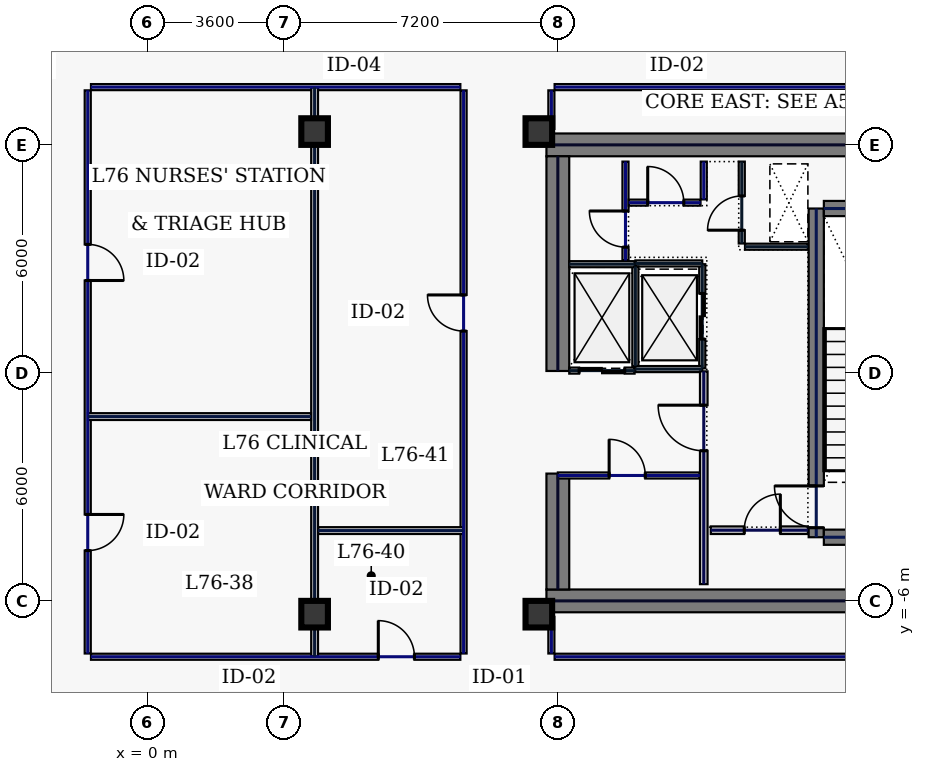
"""IFC4 building model, lengths in metres.
Left out: names, types, materials, properties, quantities, classifications, styles, units other than length and angle.
Written with IfcOpenShell. Run it as: python <this file> out.ifc"""

import sys

from ifc_helpers import new_model, si_unit, direction, frame, frame_2d, origin, origin_2d, place, context, subcontext, project, spatial, rectangle, hollow_rectangle, extrude, element, fill, save


model = new_model("IFC4")
c1 = context("Model", 3, precision=1e-05, world=origin(), true_north=direction((0.0, 1.0)))
c2 = subcontext(c1, "Body", "Model", "MODEL_VIEW")
j1 = project(units=[si_unit("LENGTHUNIT", "METRE"), si_unit("PLANEANGLEUNIT", "RADIAN")], contexts=[c1])
p1 = place(None, origin())
s1 = spatial("IfcSite", under=j1, at=p1, CompositionType="ELEMENT")
p2 = place(p1, origin())
s2 = spatial("IfcBuilding", under=s1, at=p2, CompositionType="ELEMENT")
p3 = place(p2, frame((0.0, 0.0, 325.0)))
s3 = spatial("IfcBuildingStorey", under=s2, at=p3, CompositionType="ELEMENT", Elevation=325.0)
for number, where, z_axis, x_axis in (
    (1, (10.5, 6.0, 0.0), (0.0, 0.0, 1.0), (1.0, 0.0, 0.0)),
    (2, (10.5, -6.0, 0.0), (0.0, 0.0, 1.0), (1.0, 0.0, 0.0)),
):
    element("IfcWall", number, at=place(p3, frame(where, z_axis=z_axis, x_axis=x_axis)), inside=s3, PredefinedType="SHEAR", context=c2, shape_type="SweptSolid", body=[
        extrude(rectangle(XDim=11.5, YDim=0.6, at=frame_2d((5.75, 0.0))), origin(), (0.0, 0.0, 1.0), 3.74),
    ])
p4 = place(p3, frame((10.8, -5.7, 0.0), z_axis=(0.0, 0.0, 1.0), x_axis=(0.0, 1.0, 0.0)))
e3 = element("IfcWall", 3, at=p4, inside=s3, PredefinedType="SHEAR", context=c2, shape_type="SweptSolid", body=[
    extrude(rectangle(XDim=3.05, YDim=0.6, at=frame_2d((1.525, 0.0))), origin(), (0.0, 0.0, 1.0), 3.74),
])
p5 = place(p3, frame((10.8, 0.05, 0.0), z_axis=(0.0, 0.0, 1.0), x_axis=(0.0, 1.0, 0.0)))
e4 = element("IfcWall", 4, at=p5, inside=s3, PredefinedType="SHEAR", context=c2, shape_type="SweptSolid", body=[
    extrude(rectangle(XDim=5.65, YDim=0.6, at=frame_2d((2.825, 0.0))), origin(), (0.0, 0.0, 1.0), 3.74),
])
p6 = place(p3, frame((17.6, -4.325, 0.0), z_axis=(0.0, 0.0, 1.0), x_axis=(0.0, 1.0, 0.0)))
e5 = element("IfcWall", 5, at=p6, inside=s3, PredefinedType="SHEAR", context=c2, shape_type="SweptSolid", body=[
    extrude(rectangle(XDim=8.65, YDim=0.4, at=frame_2d((4.325, 0.0))), origin(), (0.0, 0.0, 1.0), 3.74),
])
p7 = place(p6, frame((0.25, 0.0, 0.0)))
e6 = element("IfcOpeningElement", 6, at=p7, cuts=e5, PredefinedType="OPENING", context=c2, shape_type="SweptSolid", body=[
    extrude(rectangle(XDim=1.1, YDim=2.2, at=frame_2d((0.55, 1.1))), frame((0.0, 0.21, 0.0), z_axis=(0.0, -1.0, 0.0), x_axis=(1.0, 0.0, 0.0)), (0.0, 0.0, 1.0), 0.42),
])
for number, where, z_axis, x_axis in (
    (7, (17.8, -4.325, 0.0), (0.0, 0.0, 1.0), (1.0, 0.0, 0.0)),
    (8, (17.8, 4.325, 0.0), (0.0, 0.0, 1.0), (1.0, 0.0, 0.0)),
):
    element("IfcWall", number, at=place(p3, frame(where, z_axis=z_axis, x_axis=x_axis)), inside=s3, PredefinedType="SHEAR", context=c2, shape_type="SweptSolid", body=[
        extrude(rectangle(XDim=3.4, YDim=0.4, at=frame_2d((1.7, 0.0))), origin(), (0.0, 0.0, 1.0), 3.74),
    ])
for number, where, z_axis, x_axis in (
    (9, (10.3, -6.35, 0.0), (0.0, 0.0, 1.0), (1.0, 0.0, 0.0)),
    (10, (10.3, 6.35, 0.0), (0.0, 0.0, 1.0), (1.0, 0.0, 0.0)),
    (11, (4.4, -6.35, 0.0), (0.0, 0.0, 1.0), (1.0, 0.0, 0.0)),
    (12, (4.4, 6.35, 0.0), (0.0, 0.0, 1.0), (1.0, 0.0, 0.0)),
):
    element("IfcColumn", number, at=place(p3, frame(where, z_axis=z_axis, x_axis=x_axis)), inside=s3, PredefinedType="COLUMN", context=c2, shape_type="SweptSolid", body=[
        extrude(hollow_rectangle(XDim=0.7, YDim=0.7, WallThickness=0.032, at=origin_2d()), origin(), (0.0, 0.0, 1.0), 3.74),
    ])
p8 = place(p3, frame((14.6, 0.12, 0.0), z_axis=(0.0, 0.0, 1.0), x_axis=(0.0, 1.0, 0.0)))
e13 = element("IfcWall", 13, at=p8, inside=s3, PredefinedType="PARTITIONING", context=c2, shape_type="SweptSolid", body=[
    extrude(rectangle(XDim=2.74, YDim=0.16, at=frame_2d((1.37, 0.0))), origin(), (0.0, 0.0, 1.0), 3.74),
])
p9 = place(p8, frame((0.77, 0.0, 0.0)))
e14 = element("IfcOpeningElement", 14, at=p9, cuts=e13, PredefinedType="OPENING", context=c2, shape_type="SweptSolid", body=[
    extrude(rectangle(XDim=1.2, YDim=2.2, at=frame_2d((0.6, 1.1))), frame((0.0, 0.09, 0.0), z_axis=(0.0, -1.0, 0.0), x_axis=(1.0, 0.0, 0.0)), (0.0, 0.0, 1.0), 0.18),
])
for number, where, z_axis, x_axis in (
    (15, (12.84, 0.1, 0.0), (0.0, 0.0, 1.0), (1.0, 0.0, 0.0)),
    (16, (12.84, 2.88, 0.0), (0.0, 0.0, 1.0), (1.0, 0.0, 0.0)),
):
    element("IfcWall", number, at=place(p3, frame(where, z_axis=z_axis, x_axis=x_axis)), inside=s3, PredefinedType="PARTITIONING", context=c2, shape_type="SweptSolid", body=[
        extrude(rectangle(XDim=1.76, YDim=0.16, at=frame_2d((0.88, 0.0))), origin(), (0.0, 0.0, 1.0), 3.74),
    ])
p10 = place(p3, frame((12.84, 0.18, 0.0), z_axis=(0.0, 0.0, 1.0), x_axis=(0.0, 1.0, 0.0)))
e17 = element("IfcWall", 17, at=p10, inside=s3, PredefinedType="PARTITIONING", context=c2, shape_type="SweptSolid", body=[
    extrude(rectangle(XDim=2.62, YDim=0.16, at=frame_2d((1.31, 0.0))), origin(), (0.0, 0.0, 1.0), 3.74),
])
p11 = place(p3, frame((11.1, 0.06, 0.0), z_axis=(0.0, 0.0, 1.0), x_axis=(1.0, 0.0, 0.0)))
e18 = element("IfcWall", 18, at=p11, inside=s3, PredefinedType="PARTITIONING", context=c2, shape_type="SweptSolid", body=[
    extrude(rectangle(XDim=1.72, YDim=0.16, at=frame_2d((0.86, 0.0))), origin(), (0.0, 0.0, 1.0), 3.74),
])
p12 = place(p11, frame((0.26, 0.0, 0.0)))
e19 = element("IfcOpeningElement", 19, at=p12, cuts=e18, PredefinedType="OPENING", context=c2, shape_type="SweptSolid", body=[
    extrude(rectangle(XDim=1.2, YDim=2.2, at=frame_2d((0.6, 1.1))), frame((0.0, 0.09, 0.0), z_axis=(0.0, -1.0, 0.0), x_axis=(1.0, 0.0, 0.0)), (0.0, 0.0, 1.0), 0.18),
])
p13 = place(p3, frame((11.1, 2.86, 0.0), z_axis=(0.0, 0.0, 1.0), x_axis=(1.0, 0.0, 0.0)))
e20 = element("IfcWall", 20, at=p13, inside=s3, PredefinedType="PARTITIONING", context=c2, shape_type="SweptSolid", body=[
    extrude(rectangle(XDim=1.72, YDim=0.16, at=frame_2d((0.86, 0.0))), origin(), (0.0, 0.0, 1.0), 3.74),
])
p14 = place(p3, frame((15.64, 3.405, 0.0), z_axis=(0.0, 0.0, 1.0), x_axis=(0.0, 1.0, 0.0)))
e21 = element("IfcWall", 21, at=p14, inside=s3, PredefinedType="PARTITIONING", context=c2, shape_type="SweptSolid", body=[
    extrude(rectangle(XDim=2.155, YDim=0.16, at=frame_2d((1.078, 0.0))), origin(), (0.0, 0.0, 1.0), 3.74),
])
p15 = place(p14, frame((0.35, 0.0, 0.0)))
e22 = element("IfcOpeningElement", 22, at=p15, cuts=e21, PredefinedType="OPENING", context=c2, shape_type="SweptSolid", body=[
    extrude(rectangle(XDim=0.9, YDim=2.2, at=frame_2d((0.45, 1.1))), frame((0.0, 0.09, 0.0), z_axis=(0.0, -1.0, 0.0), x_axis=(1.0, 0.0, 0.0)), (0.0, 0.0, 1.0), 0.18),
])
p16 = place(p3, frame((15.725, 3.32, 0.0), z_axis=(0.0, 0.0, 1.0), x_axis=(1.0, 0.0, 0.0)))
e23 = element("IfcWall", 23, at=p16, inside=s3, PredefinedType="PARTITIONING", context=c2, shape_type="SweptSolid", body=[
    extrude(rectangle(XDim=1.655, YDim=0.16, at=frame_2d((0.827, 0.0))), origin(), (0.0, 0.0, 1.0), 3.74),
])
p17 = place(p3, frame((14.825, -4.14, 0.0), z_axis=(0.0, 0.0, 1.0), x_axis=(1.0, 0.0, 0.0)))
e24 = element("IfcWall", 24, at=p17, inside=s3, PredefinedType="SOLIDWALL", context=c2, shape_type="SweptSolid", body=[
    extrude(rectangle(XDim=2.555, YDim=0.2, at=frame_2d((1.277, 0.0))), origin(), (0.0, 0.0, 1.0), 3.74),
])
p18 = place(p17, frame((0.88, 0.0, 0.0)))
e25 = element("IfcOpeningElement", 25, at=p18, cuts=e24, PredefinedType="OPENING", context=c2, shape_type="SweptSolid", body=[
    extrude(rectangle(XDim=0.95, YDim=2.2, at=frame_2d((0.475, 1.1))), frame((0.0, 0.11, 0.0), z_axis=(0.0, -1.0, 0.0), x_axis=(1.0, 0.0, 0.0)), (0.0, 0.0, 1.0), 0.22),
])
p19 = place(p3, frame((10.8, -2.7, 0.0), z_axis=(0.0, 0.0, 1.0), x_axis=(1.0, 0.0, 0.0)))
e26 = element("IfcWall", 26, at=p19, inside=s3, PredefinedType="PARTITIONING", context=c2, shape_type="SweptSolid", body=[
    extrude(rectangle(XDim=3.735, YDim=0.16, at=frame_2d((1.867, 0.0))), origin(), (0.0, 0.0, 1.0), 3.74),
])
p20 = place(p19, frame((1.35, 0.0, 0.0)))
e27 = element("IfcOpeningElement", 27, at=p20, cuts=e26, PredefinedType="OPENING", context=c2, shape_type="SweptSolid", body=[
    extrude(rectangle(XDim=0.95, YDim=2.2, at=frame_2d((0.475, 1.1))), frame((0.0, 0.09, 0.0), z_axis=(0.0, -1.0, 0.0), x_axis=(1.0, 0.0, 0.0)), (0.0, 0.0, 1.0), 0.18),
])
p21 = place(p3, frame((12.58, 2.96, 0.0), z_axis=(0.0, 0.0, 1.0), x_axis=(0.0, 1.0, 0.0)))
e28 = element("IfcWall", 28, at=p21, inside=s3, PredefinedType="PARTITIONING", context=c2, shape_type="SweptSolid", body=[
    extrude(rectangle(XDim=2.6, YDim=0.16, at=frame_2d((1.3, 0.0))), origin(), (0.0, 0.0, 1.0), 3.74),
])
p22 = place(p21, frame((0.35, 0.0, 0.0)))
e29 = element("IfcOpeningElement", 29, at=p22, cuts=e28, PredefinedType="OPENING", context=c2, shape_type="SweptSolid", body=[
    extrude(rectangle(XDim=0.95, YDim=2.2, at=frame_2d((0.475, 1.1))), frame((0.0, 0.09, 0.0), z_axis=(0.0, -1.0, 0.0), x_axis=(1.0, 0.0, 0.0)), (0.0, 0.0, 1.0), 0.18),
])
p23 = place(p3, frame((12.665, 4.48, 0.0), z_axis=(0.0, 0.0, 1.0), x_axis=(1.0, 0.0, 0.0)))
e30 = element("IfcWall", 30, at=p23, inside=s3, PredefinedType="PARTITIONING", context=c2, shape_type="SweptSolid", body=[
    extrude(rectangle(XDim=1.89, YDim=0.16, at=frame_2d((0.945, 0.0))), origin(), (0.0, 0.0, 1.0), 3.74),
])
p24 = place(p23, frame((0.5, 0.0, 0.0)))
e31 = element("IfcOpeningElement", 31, at=p24, cuts=e30, PredefinedType="OPENING", context=c2, shape_type="SweptSolid", body=[
    extrude(rectangle(XDim=0.95, YDim=2.2, at=frame_2d((0.475, 1.1))), frame((0.0, 0.09, 0.0), z_axis=(0.0, -1.0, 0.0), x_axis=(1.0, 0.0, 0.0)), (0.0, 0.0, 1.0), 0.18),
])
p25 = place(p3, frame((14.64, 4.565, 0.0), z_axis=(0.0, 0.0, 1.0), x_axis=(0.0, 1.0, 0.0)))
e32 = element("IfcWall", 32, at=p25, inside=s3, PredefinedType="PARTITIONING", context=c2, shape_type="SweptSolid", body=[
    extrude(rectangle(XDim=0.995, YDim=0.16, at=frame_2d((0.498, 0.0))), origin(), (0.0, 0.0, 1.0), 3.74),
])
p26 = place(p3, frame((14.64, -5.56, 0.0), z_axis=(0.0, 0.0, 1.0), x_axis=(0.0, 1.0, 0.0)))
e33 = element("IfcWall", 33, at=p26, inside=s3, PredefinedType="SOLIDWALL", context=c2, shape_type="SweptSolid", body=[
    extrude(rectangle(XDim=5.6, YDim=0.2, at=frame_2d((2.8, 0.0))), origin(), (0.0, 0.0, 1.0), 3.74),
])
p27 = place(p26, frame((3.51, 0.0, 0.0)))
e34 = element("IfcOpeningElement", 34, at=p27, cuts=e33, PredefinedType="OPENING", context=c2, shape_type="SweptSolid", body=[
    extrude(rectangle(XDim=1.2, YDim=2.2, at=frame_2d((0.6, 1.1))), frame((0.0, 0.11, 0.0), z_axis=(0.0, -1.0, 0.0), x_axis=(1.0, 0.0, 0.0)), (0.0, 0.0, 1.0), 0.22),
])
p28 = place(p3, frame((21.915, 7.52, 0.0), z_axis=(0.0, 0.0, 1.0), x_axis=(-1.0, 0.0, 0.0)))
e35 = element("IfcWall", 35, at=p28, inside=s3, PredefinedType="PARTITIONING", context=c2, shape_type="SweptSolid", body=[
    extrude(rectangle(XDim=11.2, YDim=0.16, at=frame_2d((5.6, 0.0))), origin(), (0.0, 0.0, 1.0), 3.74),
])
p29 = place(p3, frame((10.63, 7.435, 0.0), z_axis=(0.0, 0.0, 1.0), x_axis=(0.0, -1.0, 0.0)))
e36 = element("IfcWall", 36, at=p29, inside=s3, PredefinedType="PARTITIONING", context=c2, shape_type="SweptSolid", body=[
    extrude(rectangle(XDim=1.015, YDim=0.16, at=frame_2d((0.508, 0.0))), origin(), (0.0, 0.0, 1.0), 3.74),
])
p30 = place(p3, frame((10.63, -6.42, 0.0), z_axis=(0.0, 0.0, 1.0), x_axis=(0.0, -1.0, 0.0)))
e37 = element("IfcWall", 37, at=p30, inside=s3, PredefinedType="PARTITIONING", context=c2, shape_type="SweptSolid", body=[
    extrude(rectangle(XDim=0.965, YDim=0.16, at=frame_2d((0.482, 0.0))), origin(), (0.0, 0.0, 1.0), 3.74),
])
p31 = place(p3, frame((10.715, -7.47, 0.0), z_axis=(0.0, 0.0, 1.0), x_axis=(1.0, 0.0, 0.0)))
e38 = element("IfcWall", 38, at=p31, inside=s3, PredefinedType="PARTITIONING", context=c2, shape_type="SweptSolid", body=[
    extrude(rectangle(XDim=11.2, YDim=0.16, at=frame_2d((5.6, 0.0))), origin(), (0.0, 0.0, 1.0), 3.74),
])
p32 = place(p3, frame((8.235, 7.52, 0.0), z_axis=(0.0, 0.0, 1.0), x_axis=(-1.0, 0.0, 0.0)))
e39 = element("IfcWall", 39, at=p32, inside=s3, PredefinedType="PARTITIONING", context=c2, shape_type="SweptSolid", body=[
    extrude(rectangle(XDim=9.72, YDim=0.16, at=frame_2d((4.86, 0.0))), origin(), (0.0, 0.0, 1.0), 3.74),
])
p33 = place(p3, frame((-1.57, 7.435, 0.0), z_axis=(0.0, 0.0, 1.0), x_axis=(0.0, -1.0, 0.0)))
e40 = element("IfcWall", 40, at=p33, inside=s3, PredefinedType="PARTITIONING", context=c2, shape_type="SweptSolid", body=[
    extrude(rectangle(XDim=14.82, YDim=0.16, at=frame_2d((7.41, 0.0))), origin(), (0.0, 0.0, 1.0), 3.74),
])
p34 = place(p33, frame((11.161, 0.0, 0.0)))
e41 = element("IfcOpeningElement", 41, at=p34, cuts=e40, PredefinedType="OPENING", context=c2, shape_type="SweptSolid", body=[
    extrude(rectangle(XDim=0.95, YDim=2.2, at=frame_2d((0.475, 1.1))), frame((0.0, 0.09, 0.0), z_axis=(0.0, -1.0, 0.0), x_axis=(1.0, 0.0, 0.0)), (0.0, 0.0, 1.0), 0.18),
])
p35 = place(p33, frame((4.054, 0.0, 0.0)))
e42 = element("IfcOpeningElement", 42, at=p35, cuts=e40, PredefinedType="OPENING", context=c2, shape_type="SweptSolid", body=[
    extrude(rectangle(XDim=0.95, YDim=2.2, at=frame_2d((0.475, 1.1))), frame((0.0, 0.09, 0.0), z_axis=(0.0, -1.0, 0.0), x_axis=(1.0, 0.0, 0.0)), (0.0, 0.0, 1.0), 0.18),
])
p36 = place(p3, frame((-1.485, -7.47, 0.0), z_axis=(0.0, 0.0, 1.0), x_axis=(1.0, 0.0, 0.0)))
e43 = element("IfcWall", 43, at=p36, inside=s3, PredefinedType="PARTITIONING", context=c2, shape_type="SweptSolid", body=[
    extrude(rectangle(XDim=9.72, YDim=0.16, at=frame_2d((4.86, 0.0))), origin(), (0.0, 0.0, 1.0), 3.74),
])
p37 = place(p36, frame((7.561, 0.0, 0.0)))
e44 = element("IfcOpeningElement", 44, at=p37, cuts=e43, PredefinedType="OPENING", context=c2, shape_type="SweptSolid", body=[
    extrude(rectangle(XDim=0.95, YDim=2.2, at=frame_2d((0.475, 1.1))), frame((0.0, 0.09, 0.0), z_axis=(0.0, -1.0, 0.0), x_axis=(1.0, 0.0, 0.0)), (0.0, 0.0, 1.0), 0.18),
])
p38 = place(p3, frame((8.32, -7.385, 0.0), z_axis=(0.0, 0.0, 1.0), x_axis=(0.0, 1.0, 0.0)))
e45 = element("IfcWall", 45, at=p38, inside=s3, PredefinedType="PARTITIONING", context=c2, shape_type="SweptSolid", body=[
    extrude(rectangle(XDim=14.82, YDim=0.16, at=frame_2d((7.41, 0.0))), origin(), (0.0, 0.0, 1.0), 3.74),
])
p39 = place(p38, frame((8.486, 0.0, 0.0)))
e46 = element("IfcOpeningElement", 46, at=p39, cuts=e45, PredefinedType="OPENING", context=c2, shape_type="SweptSolid", body=[
    extrude(rectangle(XDim=0.95, YDim=2.2, at=frame_2d((0.475, 1.1))), frame((0.0, 0.09, 0.0), z_axis=(0.0, -1.0, 0.0), x_axis=(1.0, 0.0, 0.0)), (0.0, 0.0, 1.0), 0.18),
])
p40 = place(p3, frame((4.4, -7.465, 0.0), z_axis=(0.0, 0.0, 1.0), x_axis=(0.0, 1.0, 0.0)))
e47 = element("IfcWall", 47, at=p40, inside=s3, PredefinedType="PARTITIONING", context=c2, shape_type="SweptSolid", body=[
    extrude(rectangle(XDim=14.98, YDim=0.18, at=frame_2d((7.49, 0.0))), origin(), (0.0, 0.0, 1.0), 3.035),
])
p41 = place(p3, frame((-1.565, -1.15, 0.0), z_axis=(0.0, 0.0, 1.0), x_axis=(1.0, 0.0, 0.0)))
e48 = element("IfcWall", 48, at=p41, inside=s3, PredefinedType="PARTITIONING", context=c2, shape_type="SweptSolid", body=[
    extrude(rectangle(XDim=5.87, YDim=0.18, at=frame_2d((2.935, 0.0))), origin(), (0.0, 0.0, 1.0), 3.74),
])
p42 = place(p3, frame((4.495, -4.15, 0.0), z_axis=(0.0, 0.0, 1.0), x_axis=(1.0, 0.0, 0.0)))
e49 = element("IfcWall", 49, at=p42, inside=s3, PredefinedType="PARTITIONING", context=c2, shape_type="SweptSolid", body=[
    extrude(rectangle(XDim=3.82, YDim=0.18, at=frame_2d((1.91, 0.0))), origin(), (0.0, 0.0, 1.0), 3.74),
])
p43 = place(p7, origin())
e50 = element("IfcDoor", 50, at=p43, inside=s3, OperationType="SINGLE_SWING_RIGHT", PredefinedType="DOOR", context=c2, shape_type="SweptSolid", body=[
    extrude(rectangle(XDim=1.1, YDim=2.2, at=frame_2d((0.55, 1.1))), frame((0.0, 0.025, 0.0), z_axis=(0.0, -1.0, 0.0), x_axis=(1.0, 0.0, 0.0)), (0.0, 0.0, 1.0), 0.05),
])
fill(e6, e50)
p44 = place(p9, origin())
e51 = element("IfcDoor", 51, at=p44, inside=s3, OperationType="SLIDING_TO_LEFT", PredefinedType="DOOR", context=c2, shape_type="SweptSolid", body=[
    extrude(rectangle(XDim=1.2, YDim=2.2, at=frame_2d((0.6, 1.1))), frame((0.0, 0.025, 0.0), z_axis=(0.0, -1.0, 0.0), x_axis=(1.0, 0.0, 0.0)), (0.0, 0.0, 1.0), 0.05),
])
fill(e14, e51)
p45 = place(p12, origin())
e52 = element("IfcDoor", 52, at=p45, inside=s3, OperationType="SLIDING_TO_LEFT", PredefinedType="DOOR", context=c2, shape_type="SweptSolid", body=[
    extrude(rectangle(XDim=1.2, YDim=2.2, at=frame_2d((0.6, 1.1))), frame((0.0, 0.025, 0.0), z_axis=(0.0, -1.0, 0.0), x_axis=(1.0, 0.0, 0.0)), (0.0, 0.0, 1.0), 0.05),
])
fill(e19, e52)
p46 = place(p15, origin())
e53 = element("IfcDoor", 53, at=p46, inside=s3, OperationType="SINGLE_SWING_LEFT", PredefinedType="DOOR", context=c2, shape_type="SweptSolid", body=[
    extrude(rectangle(XDim=0.9, YDim=2.2, at=frame_2d((0.45, 1.1))), frame((0.0, 0.025, 0.0), z_axis=(0.0, -1.0, 0.0), x_axis=(1.0, 0.0, 0.0)), (0.0, 0.0, 1.0), 0.05),
])
fill(e22, e53)
p47 = place(p18, origin())
e54 = element("IfcDoor", 54, at=p47, inside=s3, OperationType="SINGLE_SWING_RIGHT", PredefinedType="DOOR", context=c2, shape_type="SweptSolid", body=[
    extrude(rectangle(XDim=0.95, YDim=2.2, at=frame_2d((0.475, 1.1))), frame((0.0, 0.025, 0.0), z_axis=(0.0, -1.0, 0.0), x_axis=(1.0, 0.0, 0.0)), (0.0, 0.0, 1.0), 0.05),
])
fill(e25, e54)
p48 = place(p20, origin())
e55 = element("IfcDoor", 55, at=p48, inside=s3, OperationType="SINGLE_SWING_LEFT", PredefinedType="DOOR", context=c2, shape_type="SweptSolid", body=[
    extrude(rectangle(XDim=0.95, YDim=2.2, at=frame_2d((0.475, 1.1))), frame((0.0, 0.025, 0.0), z_axis=(0.0, -1.0, 0.0), x_axis=(1.0, 0.0, 0.0)), (0.0, 0.0, 1.0), 0.05),
])
fill(e27, e55)
p49 = place(p22, origin())
e56 = element("IfcDoor", 56, at=p49, inside=s3, OperationType="SINGLE_SWING_RIGHT", PredefinedType="DOOR", context=c2, shape_type="SweptSolid", body=[
    extrude(rectangle(XDim=0.95, YDim=2.2, at=frame_2d((0.475, 1.1))), frame((0.0, 0.025, 0.0), z_axis=(0.0, -1.0, 0.0), x_axis=(1.0, 0.0, 0.0)), (0.0, 0.0, 1.0), 0.05),
])
fill(e29, e56)
p50 = place(p24, origin())
e57 = element("IfcDoor", 57, at=p50, inside=s3, OperationType="SINGLE_SWING_LEFT", PredefinedType="DOOR", context=c2, shape_type="SweptSolid", body=[
    extrude(rectangle(XDim=0.95, YDim=2.2, at=frame_2d((0.475, 1.1))), frame((0.0, 0.025, 0.0), z_axis=(0.0, -1.0, 0.0), x_axis=(1.0, 0.0, 0.0)), (0.0, 0.0, 1.0), 0.05),
])
fill(e31, e57)
p51 = place(p27, origin())
e58 = element("IfcDoor", 58, at=p51, inside=s3, OperationType="SINGLE_SWING_RIGHT", PredefinedType="DOOR", context=c2, shape_type="SweptSolid", body=[
    extrude(rectangle(XDim=1.2, YDim=2.2, at=frame_2d((0.6, 1.1))), frame((0.0, 0.025, 0.0), z_axis=(0.0, -1.0, 0.0), x_axis=(1.0, 0.0, 0.0)), (0.0, 0.0, 1.0), 0.05),
])
fill(e34, e58)
p52 = place(p34, origin())
e59 = element("IfcDoor", 59, at=p52, inside=s3, OperationType="SINGLE_SWING_LEFT", PredefinedType="DOOR", context=c2, shape_type="SweptSolid", body=[
    extrude(rectangle(XDim=0.95, YDim=2.2, at=frame_2d((0.475, 1.1))), frame((0.0, 0.025, 0.0), z_axis=(0.0, -1.0, 0.0), x_axis=(1.0, 0.0, 0.0)), (0.0, 0.0, 1.0), 0.05),
])
fill(e41, e59)
p53 = place(p35, origin())
e60 = element("IfcDoor", 60, at=p53, inside=s3, OperationType="SINGLE_SWING_RIGHT", PredefinedType="DOOR", context=c2, shape_type="SweptSolid", body=[
    extrude(rectangle(XDim=0.95, YDim=2.2, at=frame_2d((0.475, 1.1))), frame((0.0, 0.025, 0.0), z_axis=(0.0, -1.0, 0.0), x_axis=(1.0, 0.0, 0.0)), (0.0, 0.0, 1.0), 0.05),
])
fill(e42, e60)
p54 = place(p37, origin())
e61 = element("IfcDoor", 61, at=p54, inside=s3, OperationType="SINGLE_SWING_LEFT", PredefinedType="DOOR", context=c2, shape_type="SweptSolid", body=[
    extrude(rectangle(XDim=0.95, YDim=2.2, at=frame_2d((0.475, 1.1))), frame((0.0, 0.025, 0.0), z_axis=(0.0, -1.0, 0.0), x_axis=(1.0, 0.0, 0.0)), (0.0, 0.0, 1.0), 0.05),
])
fill(e44, e61)
p55 = place(p39, origin())
e62 = element("IfcDoor", 62, at=p55, inside=s3, OperationType="SINGLE_SWING_RIGHT", PredefinedType="DOOR", context=c2, shape_type="SweptSolid", body=[
    extrude(rectangle(XDim=0.95, YDim=2.2, at=frame_2d((0.475, 1.1))), frame((0.0, 0.025, 0.0), z_axis=(0.0, -1.0, 0.0), x_axis=(1.0, 0.0, 0.0)), (0.0, 0.0, 1.0), 0.05),
])
fill(e46, e62)
save(model, sys.argv[1])
